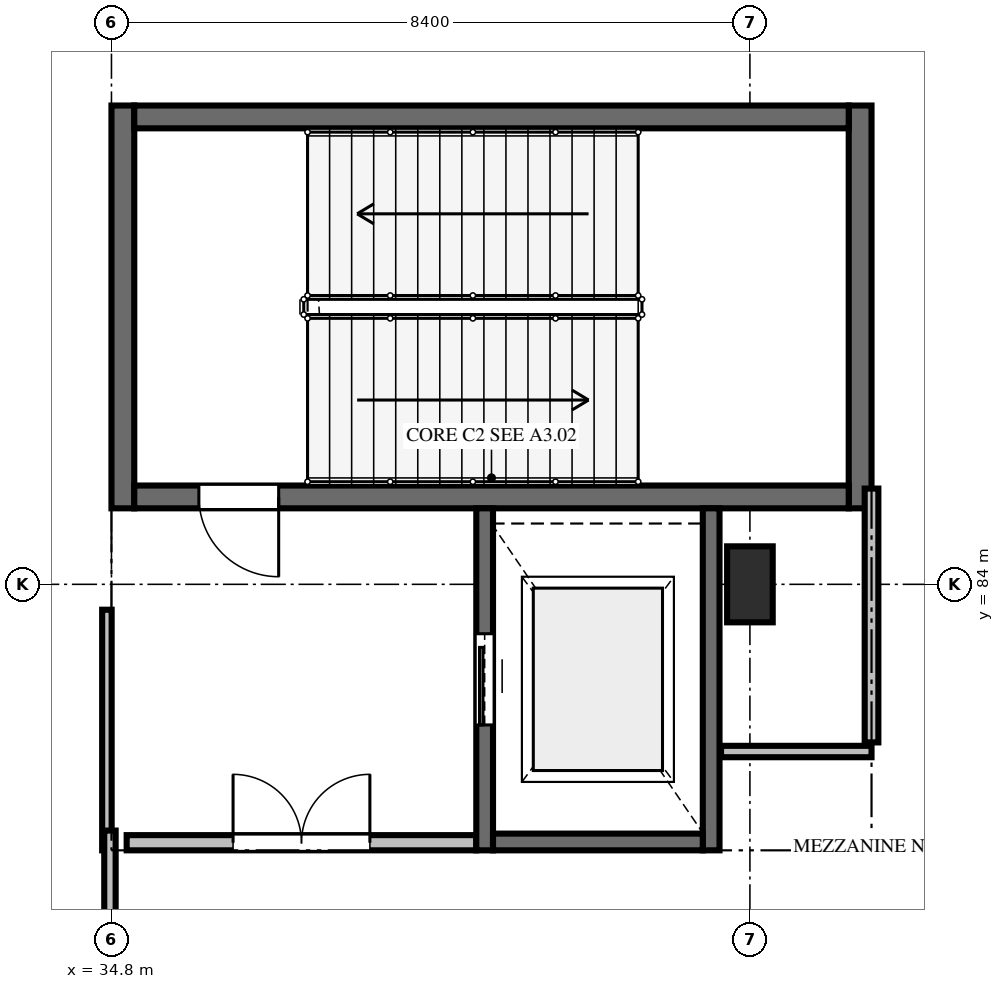
"""IFC4 building model, lengths in metres.
Left out: names, types, materials, properties, quantities, classifications, styles, units other than length and angle.
Written with IfcOpenShell. Run it as: python <this file> out.ifc"""

import sys

from ifc_helpers import new_model, si_unit, direction, frame, frame_2d, origin, origin_2d, place, context, subcontext, project, spatial, rectangle, extrude, element, fill, save


model = new_model("IFC4")
c1 = context("Model", 3, precision=1e-05, world=origin(), true_north=direction((0.0, 1.0)))
c2 = subcontext(c1, "Body", "Model", "MODEL_VIEW")
j1 = project(units=[si_unit("LENGTHUNIT", "METRE"), si_unit("PLANEANGLEUNIT", "RADIAN")], contexts=[c1])
p1 = place(None, origin())
s1 = spatial("IfcSite", under=j1, at=p1, CompositionType="ELEMENT")
p2 = place(p1, origin())
s2 = spatial("IfcBuilding", under=s1, at=p2, CompositionType="ELEMENT")
p3 = place(p2, frame((0.0, 0.0, 5.4)))
s3 = spatial("IfcBuildingStorey", under=s2, at=p3, CompositionType="ELEMENT", Elevation=5.4)
p4 = place(p3, frame((43.2, 84.0, 0.0), z_axis=(0.0, 0.0, 1.0), x_axis=(1.0, 0.0, 0.0)))
e1 = element("IfcColumn", 1, at=p4, inside=s3, PredefinedType="COLUMN", context=c2, shape_type="SweptSolid", body=[
    extrude(rectangle(XDim=0.6, YDim=1.0, at=origin_2d()), origin(), (0.0, 0.0, 1.0), 5.4),
])
for number, where, z_axis, x_axis in (
    (2, (34.95, 85.0, 0.0), (0.0, 0.0, 1.0), (0.0, 1.0, 0.0)),
    (3, (44.65, 90.3, 0.0), (0.0, 0.0, 1.0), (0.0, -1.0, 0.0)),
):
    element("IfcWall", number, at=place(p3, frame(where, z_axis=z_axis, x_axis=x_axis)), inside=s3, PredefinedType="SHEAR", context=c2, shape_type="SweptSolid", body=[
        extrude(rectangle(XDim=5.3, YDim=0.3, at=frame_2d((2.65, 0.0))), origin(), (0.0, 0.0, 1.0), 4.98),
    ])
p5 = place(p3, frame((44.5, 85.15, 0.0), z_axis=(0.0, 0.0, 1.0), x_axis=(-1.0, 0.0, 0.0)))
e4 = element("IfcWall", 4, at=p5, inside=s3, PredefinedType="SHEAR", context=c2, shape_type="SweptSolid", body=[
    extrude(rectangle(XDim=9.4, YDim=0.3, at=frame_2d((4.7, 0.0))), origin(), (0.0, 0.0, 1.0), 4.98),
])
p6 = place(p5, frame((7.5, 0.0, 0.0)))
e5 = element("IfcOpeningElement", 5, at=p6, cuts=e4, PredefinedType="OPENING", context=c2, shape_type="SweptSolid", body=[
    extrude(rectangle(XDim=1.05, YDim=2.2, at=frame_2d((0.525, 1.1))), frame((0.0, 0.16, 0.0), z_axis=(0.0, -1.0, 0.0), x_axis=(1.0, 0.0, 0.0)), (0.0, 0.0, 1.0), 0.32),
])
p7 = place(p3, frame((35.1, 90.15, 0.0), z_axis=(0.0, 0.0, 1.0), x_axis=(1.0, 0.0, 0.0)))
e6 = element("IfcWall", 6, at=p7, inside=s3, PredefinedType="SHEAR", context=c2, shape_type="SweptSolid", body=[
    extrude(rectangle(XDim=9.4, YDim=0.3, at=frame_2d((4.7, 0.0))), origin(), (0.0, 0.0, 1.0), 4.98),
])
p8 = place(p3, frame((35.0, 80.6, 0.0), z_axis=(0.0, 0.0, 1.0), x_axis=(1.0, 0.0, 0.0)))
e7 = element("IfcWall", 7, at=p8, inside=s3, PredefinedType="SOLIDWALL", context=c2, shape_type="SweptSolid", body=[
    extrude(rectangle(XDim=4.6, YDim=0.2, at=frame_2d((2.3, 0.0))), origin(), (0.0, 0.0, 1.0), 4.178),
])
p9 = place(p8, frame((1.4, 0.0, 0.0)))
e8 = element("IfcOpeningElement", 8, at=p9, cuts=e7, PredefinedType="OPENING", context=c2, shape_type="SweptSolid", body=[
    extrude(rectangle(XDim=1.8, YDim=2.2, at=frame_2d((0.9, 1.1))), frame((0.0, 0.11, 0.0), z_axis=(0.0, -1.0, 0.0), x_axis=(1.0, 0.0, 0.0)), (0.0, 0.0, 1.0), 0.22),
])
p10 = place(p3, frame((39.71, 80.5, 0.0), z_axis=(0.0, 0.0, 1.0), x_axis=(0.0, 1.0, 0.0)))
e9 = element("IfcWall", 9, at=p10, inside=s3, PredefinedType="SOLIDWALL", context=c2, shape_type="SweptSolid", body=[
    extrude(rectangle(XDim=4.5, YDim=0.22, at=frame_2d((2.25, 0.0))), origin(), (0.0, 0.0, 1.0), 4.98),
])
p11 = place(p10, frame((1.65, 0.0, 0.0)))
e10 = element("IfcOpeningElement", 10, at=p11, cuts=e9, PredefinedType="OPENING", context=c2, shape_type="SweptSolid", body=[
    extrude(rectangle(XDim=1.2, YDim=2.2, at=frame_2d((0.6, 1.1))), frame((0.0, 0.12, 0.0), z_axis=(0.0, -1.0, 0.0), x_axis=(1.0, 0.0, 0.0)), (0.0, 0.0, 1.0), 0.24),
])
p12 = place(p3, frame((42.69, 80.5, 0.0), z_axis=(0.0, 0.0, 1.0), x_axis=(0.0, 1.0, 0.0)))
e11 = element("IfcWall", 11, at=p12, inside=s3, PredefinedType="SOLIDWALL", context=c2, shape_type="SweptSolid", body=[
    extrude(rectangle(XDim=4.5, YDim=0.22, at=frame_2d((2.25, 0.0))), origin(), (0.0, 0.0, 1.0), 4.98),
])
p13 = place(p3, frame((39.82, 80.61, 0.0), z_axis=(0.0, 0.0, 1.0), x_axis=(1.0, 0.0, 0.0)))
e12 = element("IfcWall", 12, at=p13, inside=s3, PredefinedType="SOLIDWALL", context=c2, shape_type="SweptSolid", body=[
    extrude(rectangle(XDim=2.76, YDim=0.22, at=frame_2d((1.38, 0.0))), origin(), (0.0, 0.0, 1.0), 4.98),
])
p14 = place(p3, frame((34.74, 83.666, 0.0), z_axis=(0.0, 0.0, 1.0), x_axis=(0.0, -1.0, 0.0)))
e13 = element("IfcWall", 13, at=p14, inside=s3, PredefinedType="PARTITIONING", context=c2, shape_type="SweptSolid", body=[
    extrude(rectangle(XDim=3.166, YDim=0.125, at=frame_2d((1.583, 0.0))), origin(), (0.0, 0.0, 1.0), 4.178),
])
p15 = place(p3, frame((34.78, 80.76, 0.0), z_axis=(0.0, 0.0, 1.0), x_axis=(0.0, -1.0, 0.0)))
e14 = element("IfcWall", 14, at=p15, inside=s3, PredefinedType="PARTITIONING", context=c2, shape_type="SweptSolid", body=[
    extrude(rectangle(XDim=4.82, YDim=0.15, at=frame_2d((2.41, 0.0))), origin(), (0.0, 0.0, 1.0), 4.178),
])
p16 = place(p3, frame((42.82, 81.8, 0.0), z_axis=(0.0, 0.0, 1.0), x_axis=(1.0, 0.0, 0.0)))
e15 = element("IfcWall", 15, at=p16, inside=s3, PredefinedType="PARTITIONING", context=c2, shape_type="SweptSolid", body=[
    extrude(rectangle(XDim=1.98, YDim=0.15, at=frame_2d((0.99, 0.0))), origin(), (0.0, 0.0, 1.0), 4.53),
])
p17 = place(p3, frame((44.8, 81.92, 0.0), z_axis=(0.0, 0.0, 1.0), x_axis=(0.0, 1.0, 0.0)))
e16 = element("IfcWall", 16, at=p17, inside=s3, PredefinedType="PARTITIONING", context=c2, shape_type="SweptSolid", body=[
    extrude(rectangle(XDim=3.34, YDim=0.18, at=frame_2d((1.67, 0.0))), origin(), (0.0, 0.0, 1.0), 4.27),
])
p18 = place(p6, origin())
e17 = element("IfcDoor", 17, at=p18, inside=s3, OperationType="SINGLE_SWING_LEFT", PredefinedType="DOOR", context=c2, shape_type="SweptSolid", body=[
    extrude(rectangle(XDim=1.05, YDim=2.2, at=frame_2d((0.525, 1.1))), frame((0.0, 0.025, 0.0), z_axis=(0.0, -1.0, 0.0), x_axis=(1.0, 0.0, 0.0)), (0.0, 0.0, 1.0), 0.05),
])
fill(e5, e17)
p19 = place(p9, origin())
e18 = element("IfcDoor", 18, at=p19, inside=s3, OperationType="DOUBLE_DOOR_SINGLE_SWING", PredefinedType="DOOR", context=c2, shape_type="SweptSolid", body=[
    extrude(rectangle(XDim=1.8, YDim=2.2, at=frame_2d((0.9, 1.1))), frame((0.0, 0.025, 0.0), z_axis=(0.0, -1.0, 0.0), x_axis=(1.0, 0.0, 0.0)), (0.0, 0.0, 1.0), 0.05),
])
fill(e8, e18)
p20 = place(p11, origin())
e19 = element("IfcDoor", 19, at=p20, inside=s3, OperationType="SLIDING_TO_LEFT", PredefinedType="DOOR", context=c2, shape_type="SweptSolid", body=[
    extrude(rectangle(XDim=1.2, YDim=2.2, at=frame_2d((0.6, 1.1))), frame((0.0, 0.025, 0.0), z_axis=(0.0, -1.0, 0.0), x_axis=(1.0, 0.0, 0.0)), (0.0, 0.0, 1.0), 0.05),
])
fill(e10, e19)
save(model, sys.argv[1])
